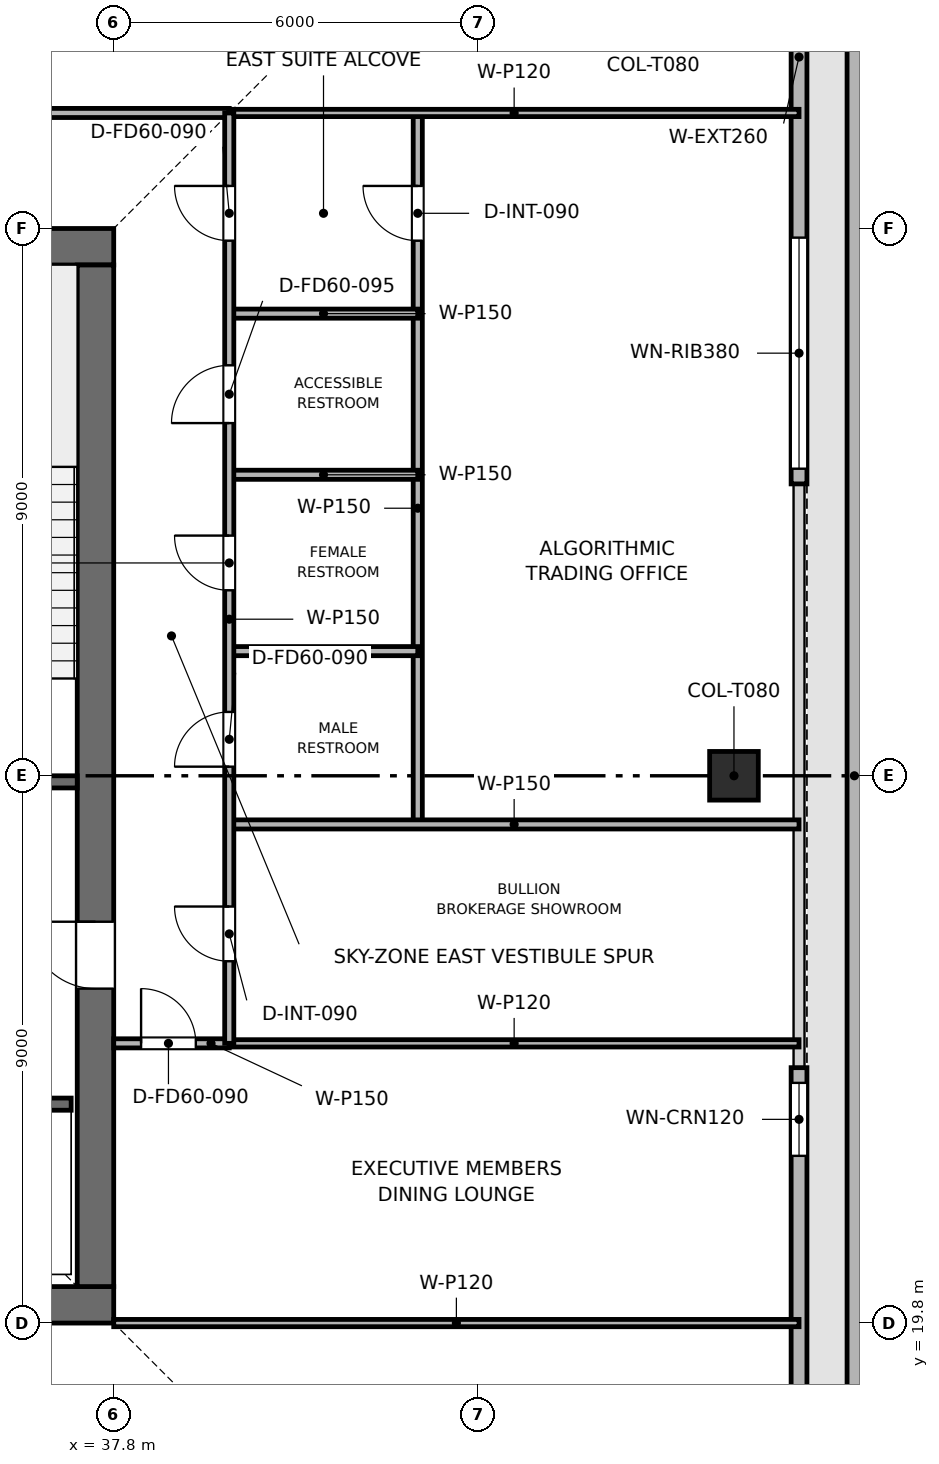
"""IFC4 building model, lengths in metres.
Left out: names, types, materials, properties, quantities, classifications, styles, units other than length and angle.
Written with IfcOpenShell. Run it as: python <this file> out.ifc"""

import sys

from ifc_helpers import new_model, si_unit, direction, frame, frame_2d, origin, origin_2d, place, context, subcontext, project, spatial, rectangle, extrude, element, fill, save


model = new_model("IFC4")
c1 = context("Model", 3, precision=1e-05, world=origin(), true_north=direction((0.0, 1.0)))
c2 = subcontext(c1, "Body", "Model", "MODEL_VIEW")
j1 = project(units=[si_unit("LENGTHUNIT", "METRE"), si_unit("PLANEANGLEUNIT", "RADIAN")], contexts=[c1])
p1 = place(None, origin())
s1 = spatial("IfcSite", under=j1, at=p1, CompositionType="ELEMENT")
p2 = place(p1, origin())
s2 = spatial("IfcBuilding", under=s1, at=p2, CompositionType="ELEMENT")
p3 = place(p2, frame((0.0, 0.0, 355.5)))
s3 = spatial("IfcBuildingStorey", under=s2, at=p3, CompositionType="ELEMENT", Elevation=355.5)
p4 = place(p3, frame((19.8, 20.1, 0.0), z_axis=(0.0, 0.0, 1.0), x_axis=(1.0, 0.0, 0.0)))
e1 = element("IfcWall", 1, at=p4, inside=s3, PredefinedType="SHEAR", context=c2, shape_type="SweptSolid", body=[
    extrude(rectangle(XDim=18.0, YDim=0.6, at=frame_2d((9.0, 0.0))), origin(), (0.0, 0.0, 1.0), 4.5),
])
p5 = place(p3, frame((19.8, 37.5, 0.0), z_axis=(0.0, 0.0, 1.0), x_axis=(1.0, 0.0, 0.0)))
e2 = element("IfcWall", 2, at=p5, inside=s3, PredefinedType="SHEAR", context=c2, shape_type="SweptSolid", body=[
    extrude(rectangle(XDim=18.0, YDim=0.6, at=frame_2d((9.0, 0.0))), origin(), (0.0, 0.0, 1.0), 4.5),
])
p6 = place(p5, frame((7.05, 0.0, 0.0)))
e3 = element("IfcOpeningElement", 3, at=p6, cuts=e2, PredefinedType="OPENING", context=c2, shape_type="SweptSolid", body=[
    extrude(rectangle(XDim=1.1, YDim=2.15, at=frame_2d((0.55, 1.075))), frame((0.0, 0.31, 0.0), z_axis=(0.0, -1.0, 0.0), x_axis=(1.0, 0.0, 0.0)), (0.0, 0.0, 1.0), 0.62),
])
p7 = place(p3, frame((37.5, 20.4, 0.0), z_axis=(0.0, 0.0, 1.0), x_axis=(0.0, 1.0, 0.0)))
e4 = element("IfcWall", 4, at=p7, inside=s3, PredefinedType="SHEAR", context=c2, shape_type="SweptSolid", body=[
    extrude(rectangle(XDim=16.8, YDim=0.6, at=frame_2d((8.4, 0.0))), origin(), (0.0, 0.0, 1.0), 4.5),
])
p8 = place(p7, frame((4.9, 0.0, 0.0)))
e5 = element("IfcOpeningElement", 5, at=p8, cuts=e4, PredefinedType="OPENING", context=c2, shape_type="SweptSolid", body=[
    extrude(rectangle(XDim=1.1, YDim=2.15, at=frame_2d((0.55, 1.075))), frame((0.0, 0.31, 0.0), z_axis=(0.0, -1.0, 0.0), x_axis=(1.0, 0.0, 0.0)), (0.0, 0.0, 1.0), 0.62),
])
p9 = place(p3, frame((48.0, 28.8, 0.003), z_axis=(0.0, 0.0, 1.0), x_axis=(1.0, 0.0, 0.0)))
e6 = element("IfcColumn", 6, at=p9, inside=s3, PredefinedType="COLUMN", context=c2, shape_type="SweptSolid", body=[
    extrude(rectangle(XDim=0.8, YDim=0.8, at=origin_2d()), origin(), (0.0, 0.0, 1.0), 4.234),
])
p10 = place(p3, frame((49.98, 13.555, 0.0), z_axis=(0.0, 0.0, 1.0), x_axis=(0.0, 1.0, 0.0)))
e7 = element("IfcWall", 7, at=p10, inside=s3, PredefinedType="PARAPET", context=c2, shape_type="SweptSolid", body=[
    extrude(rectangle(XDim=30.49, YDim=0.24, at=frame_2d((15.245, 0.0))), origin(), (0.0, 0.0, 1.0), 1.2),
])
p11 = place(p3, frame((49.07, 43.6, 0.0), z_axis=(0.0, 0.0, 1.0), x_axis=(0.0, -1.0, 0.0)))
e8 = element("IfcWall", 8, at=p11, inside=s3, PredefinedType="SOLIDWALL", context=c2, shape_type="SweptSolid", body=[
    extrude(rectangle(XDim=10.0, YDim=0.26, at=frame_2d((5.0, 0.0))), origin(), (0.0, 0.0, 1.0), 4.24),
])
p12 = place(p11, frame((5.95, 0.0, 0.9)))
e9 = element("IfcOpeningElement", 9, at=p12, cuts=e8, PredefinedType="OPENING", context=c2, shape_type="SweptSolid", body=[
    extrude(rectangle(XDim=3.8, YDim=1.9, at=frame_2d((1.9, 0.95))), frame((0.0, 0.14, 0.0), z_axis=(0.0, -1.0, 0.0), x_axis=(1.0, 0.0, 0.0)), (0.0, 0.0, 1.0), 0.28),
])
p13 = place(p3, frame((49.07, 24.0, 0.0), z_axis=(0.0, 0.0, 1.0), x_axis=(0.0, -1.0, 0.0)))
e10 = element("IfcWall", 10, at=p13, inside=s3, PredefinedType="SOLIDWALL", context=c2, shape_type="SweptSolid", body=[
    extrude(rectangle(XDim=10.0, YDim=0.26, at=frame_2d((5.0, 0.0))), origin(), (0.0, 0.0, 1.0), 4.24),
])
p14 = place(p13, frame((0.25, 0.0, 0.9)))
e11 = element("IfcOpeningElement", 11, at=p14, cuts=e10, PredefinedType="OPENING", context=c2, shape_type="SweptSolid", body=[
    extrude(rectangle(XDim=1.2, YDim=2.1, at=frame_2d((0.6, 1.05))), frame((0.0, 0.14, 0.0), z_axis=(0.0, -1.0, 0.0), x_axis=(1.0, 0.0, 0.0)), (0.0, 0.0, 1.0), 0.28),
])
p15 = place(p3, frame((34.05, 28.7, 0.0), z_axis=(0.0, 0.0, 1.0), x_axis=(1.0, 0.0, 0.0)))
e12 = element("IfcWall", 12, at=p15, inside=s3, PredefinedType="SHEAR", context=c2, shape_type="SweptSolid", body=[
    extrude(rectangle(XDim=3.15, YDim=0.2, at=frame_2d((1.575, 0.0))), origin(), (0.0, 0.0, 1.0), 4.24),
])
p16 = place(p15, frame((0.8, 0.0, 0.0)))
e13 = element("IfcOpeningElement", 13, at=p16, cuts=e12, PredefinedType="OPENING", context=c2, shape_type="SweptSolid", body=[
    extrude(rectangle(XDim=1.0, YDim=2.1, at=frame_2d((0.5, 1.05))), frame((0.0, 0.11, 0.0), z_axis=(0.0, -1.0, 0.0), x_axis=(1.0, 0.0, 0.0)), (0.0, 0.0, 1.0), 0.22),
])
p17 = place(p3, frame((34.05, 23.4, 0.0), z_axis=(0.0, 0.0, 1.0), x_axis=(1.0, 0.0, 0.0)))
e14 = element("IfcWall", 14, at=p17, inside=s3, PredefinedType="SHEAR", context=c2, shape_type="SweptSolid", body=[
    extrude(rectangle(XDim=3.05, YDim=0.2, at=frame_2d((1.525, 0.0))), origin(), (0.0, 0.0, 1.0), 4.24),
])
p18 = place(p17, frame((1.2, 0.0, 0.0)))
e15 = element("IfcOpeningElement", 15, at=p18, cuts=e14, PredefinedType="OPENING", context=c2, shape_type="SweptSolid", body=[
    extrude(rectangle(XDim=1.1, YDim=2.15, at=frame_2d((0.55, 1.075))), frame((0.0, 0.11, 0.0), z_axis=(0.0, -1.0, 0.0), x_axis=(1.0, 0.0, 0.0)), (0.0, 0.0, 1.0), 0.22),
])
p19 = place(p3, frame((37.8, 19.8, 0.0), z_axis=(0.0, 0.0, 1.0), x_axis=(1.0, 0.0, 0.0)))
e16 = element("IfcWall", 16, at=p19, inside=s3, PredefinedType="PARTITIONING", context=c2, shape_type="SweptSolid", body=[
    extrude(rectangle(XDim=11.27, YDim=0.12, at=frame_2d((5.635, 0.0))), origin(), (0.0, 0.0, 1.0), 3.825),
])
p20 = place(p3, frame((37.8, 24.4, 0.0), z_axis=(0.0, 0.0, 1.0), x_axis=(1.0, 0.0, 0.0)))
e17 = element("IfcWall", 17, at=p20, inside=s3, PredefinedType="PARTITIONING", context=c2, shape_type="SweptSolid", body=[
    extrude(rectangle(XDim=1.9, YDim=0.15, at=frame_2d((0.95, 0.0))), origin(), (0.0, 0.0, 1.0), 4.24),
])
p21 = place(p20, frame((0.45, 0.0, 0.0)))
e18 = element("IfcOpeningElement", 18, at=p21, cuts=e17, PredefinedType="OPENING", context=c2, shape_type="SweptSolid", body=[
    extrude(rectangle(XDim=0.9, YDim=2.1, at=frame_2d((0.45, 1.05))), frame((0.0, 0.085, 0.0), z_axis=(0.0, -1.0, 0.0), x_axis=(1.0, 0.0, 0.0)), (0.0, 0.0, 1.0), 0.17),
])
p22 = place(p3, frame((39.7, 24.4, 0.0), z_axis=(0.0, 0.0, 1.0), x_axis=(1.0, 0.0, 0.0)))
e19 = element("IfcWall", 19, at=p22, inside=s3, PredefinedType="PARTITIONING", context=c2, shape_type="SweptSolid", body=[
    extrude(rectangle(XDim=9.37, YDim=0.12, at=frame_2d((4.685, 0.0))), origin(), (0.0, 0.0, 1.0), 3.865),
])
p23 = place(p3, frame((42.8, 28.0, 0.0), z_axis=(0.0, 0.0, 1.0), x_axis=(0.0, 1.0, 0.0)))
e20 = element("IfcWall", 20, at=p23, inside=s3, PredefinedType="PARTITIONING", context=c2, shape_type="SweptSolid", body=[
    extrude(rectangle(XDim=11.7, YDim=0.15, at=frame_2d((5.85, 0.0))), origin(), (0.0, 0.0, 1.0), 3.825),
])
p24 = place(p23, frame((9.6, 0.0, 0.0)))
e21 = element("IfcOpeningElement", 21, at=p24, cuts=e20, PredefinedType="OPENING", context=c2, shape_type="SweptSolid", body=[
    extrude(rectangle(XDim=0.9, YDim=2.1, at=frame_2d((0.45, 1.05))), frame((0.0, 0.085, 0.0), z_axis=(0.0, -1.0, 0.0), x_axis=(1.0, 0.0, 0.0)), (0.0, 0.0, 1.0), 0.17),
])
p25 = place(p3, frame((39.7, 28.0, 0.0), z_axis=(0.0, 0.0, 1.0), x_axis=(1.0, 0.0, 0.0)))
e22 = element("IfcWall", 22, at=p25, inside=s3, PredefinedType="PARTITIONING", context=c2, shape_type="SweptSolid", body=[
    extrude(rectangle(XDim=9.37, YDim=0.15, at=frame_2d((4.685, 0.0))), origin(), (0.0, 0.0, 1.0), 3.865),
])
for number, where, z_axis, x_axis in (
    (23, (39.7, 36.4, 0.0), (0.0, 0.0, 1.0), (1.0, 0.0, 0.0)),
    (24, (39.7, 30.85, 0.0), (0.0, 0.0, 1.0), (1.0, 0.0, 0.0)),
    (25, (39.7, 33.75, 0.0), (0.0, 0.0, 1.0), (1.0, 0.0, 0.0)),
):
    element("IfcWall", number, at=place(p3, frame(where, z_axis=z_axis, x_axis=x_axis)), inside=s3, PredefinedType="PARTITIONING", context=c2, shape_type="SweptSolid", body=[
        extrude(rectangle(XDim=3.1, YDim=0.15, at=frame_2d((1.55, 0.0))), origin(), (0.0, 0.0, 1.0), 3.865),
    ])
p26 = place(p3, frame((39.7, 39.7, 0.0), z_axis=(0.0, 0.0, 1.0), x_axis=(1.0, 0.0, 0.0)))
e26 = element("IfcWall", 26, at=p26, inside=s3, PredefinedType="PARTITIONING", context=c2, shape_type="SweptSolid", body=[
    extrude(rectangle(XDim=9.37, YDim=0.12, at=frame_2d((4.685, 0.0))), origin(), (0.0, 0.0, 1.0), 3.825),
])
p27 = place(p3, frame((17.9, 39.7, 0.0), z_axis=(0.0, 0.0, 1.0), x_axis=(1.0, 0.0, 0.0)))
e27 = element("IfcWall", 27, at=p27, inside=s3, PredefinedType="PARTITIONING", context=c2, shape_type="SweptSolid", body=[
    extrude(rectangle(XDim=21.8, YDim=0.15, at=frame_2d((10.9, 0.0))), origin(), (0.0, 0.0, 1.0), 3.825),
])
p28 = place(p27, frame((0.765, 0.0, 0.0)))
e28 = element("IfcOpeningElement", 28, at=p28, cuts=e27, PredefinedType="OPENING", context=c2, shape_type="SweptSolid", body=[
    extrude(rectangle(XDim=0.9, YDim=2.1, at=frame_2d((0.45, 1.05))), frame((0.0, 0.085, 0.0), z_axis=(0.0, -1.0, 0.0), x_axis=(1.0, 0.0, 0.0)), (0.0, 0.0, 1.0), 0.17),
])
p29 = place(p27, frame((6.195, 0.0, 0.0)))
e29 = element("IfcOpeningElement", 29, at=p29, cuts=e27, PredefinedType="OPENING", context=c2, shape_type="SweptSolid", body=[
    extrude(rectangle(XDim=0.9, YDim=2.1, at=frame_2d((0.45, 1.05))), frame((0.0, 0.085, 0.0), z_axis=(0.0, -1.0, 0.0), x_axis=(1.0, 0.0, 0.0)), (0.0, 0.0, 1.0), 0.17),
])
p30 = place(p27, frame((15.88, 0.0, 0.0)))
e30 = element("IfcOpeningElement", 30, at=p30, cuts=e27, PredefinedType="OPENING", context=c2, shape_type="SweptSolid", body=[
    extrude(rectangle(XDim=0.9, YDim=2.1, at=frame_2d((0.45, 1.05))), frame((0.0, 0.085, 0.0), z_axis=(0.0, -1.0, 0.0), x_axis=(1.0, 0.0, 0.0)), (0.0, 0.0, 1.0), 0.17),
])
p31 = place(p3, frame((39.7, 24.4, 0.0), z_axis=(0.0, 0.0, 1.0), x_axis=(0.0, 1.0, 0.0)))
e31 = element("IfcWall", 31, at=p31, inside=s3, PredefinedType="PARTITIONING", context=c2, shape_type="SweptSolid", body=[
    extrude(rectangle(XDim=15.3, YDim=0.15, at=frame_2d((7.65, 0.0))), origin(), (0.0, 0.0, 1.0), 3.825),
])
p32 = place(p31, frame((1.35, 0.0, 0.0)))
e32 = element("IfcOpeningElement", 32, at=p32, cuts=e31, PredefinedType="OPENING", context=c2, shape_type="SweptSolid", body=[
    extrude(rectangle(XDim=0.9, YDim=2.1, at=frame_2d((0.45, 1.05))), frame((0.0, 0.085, 0.0), z_axis=(0.0, -1.0, 0.0), x_axis=(1.0, 0.0, 0.0)), (0.0, 0.0, 1.0), 0.17),
])
p33 = place(p31, frame((4.55, 0.0, 0.0)))
e33 = element("IfcOpeningElement", 33, at=p33, cuts=e31, PredefinedType="OPENING", context=c2, shape_type="SweptSolid", body=[
    extrude(rectangle(XDim=0.9, YDim=2.1, at=frame_2d((0.45, 1.05))), frame((0.0, 0.085, 0.0), z_axis=(0.0, -1.0, 0.0), x_axis=(1.0, 0.0, 0.0)), (0.0, 0.0, 1.0), 0.17),
])
p34 = place(p31, frame((7.45, 0.0, 0.0)))
e34 = element("IfcOpeningElement", 34, at=p34, cuts=e31, PredefinedType="OPENING", context=c2, shape_type="SweptSolid", body=[
    extrude(rectangle(XDim=0.9, YDim=2.1, at=frame_2d((0.45, 1.05))), frame((0.0, 0.085, 0.0), z_axis=(0.0, -1.0, 0.0), x_axis=(1.0, 0.0, 0.0)), (0.0, 0.0, 1.0), 0.17),
])
p35 = place(p31, frame((10.2, 0.0, 0.0)))
e35 = element("IfcOpeningElement", 35, at=p35, cuts=e31, PredefinedType="OPENING", context=c2, shape_type="SweptSolid", body=[
    extrude(rectangle(XDim=0.95, YDim=2.1, at=frame_2d((0.475, 1.05))), frame((0.0, 0.085, 0.0), z_axis=(0.0, -1.0, 0.0), x_axis=(1.0, 0.0, 0.0)), (0.0, 0.0, 1.0), 0.17),
])
p36 = place(p31, frame((13.2, 0.0, 0.0)))
e36 = element("IfcOpeningElement", 36, at=p36, cuts=e31, PredefinedType="OPENING", context=c2, shape_type="SweptSolid", body=[
    extrude(rectangle(XDim=0.9, YDim=2.1, at=frame_2d((0.45, 1.05))), frame((0.0, 0.085, 0.0), z_axis=(0.0, -1.0, 0.0), x_axis=(1.0, 0.0, 0.0)), (0.0, 0.0, 1.0), 0.17),
])
p37 = place(p12, origin())
e37 = element("IfcWindow", 37, at=p37, inside=s3, PartitioningType="SINGLE_PANEL", PredefinedType="WINDOW", context=c2, shape_type="SweptSolid", body=[
    extrude(rectangle(XDim=3.8, YDim=1.9, at=frame_2d((1.9, 0.95))), frame((0.0, 0.03, 0.0), z_axis=(0.0, -1.0, 0.0), x_axis=(1.0, 0.0, 0.0)), (0.0, 0.0, 1.0), 0.06),
])
fill(e9, e37)
p38 = place(p14, origin())
e38 = element("IfcWindow", 38, at=p38, inside=s3, PartitioningType="SINGLE_PANEL", PredefinedType="WINDOW", context=c2, shape_type="SweptSolid", body=[
    extrude(rectangle(XDim=1.2, YDim=2.1, at=frame_2d((0.6, 1.05))), frame((0.0, 0.03, 0.0), z_axis=(0.0, -1.0, 0.0), x_axis=(1.0, 0.0, 0.0)), (0.0, 0.0, 1.0), 0.06),
])
fill(e11, e38)
p39 = place(p21, origin())
e39 = element("IfcDoor", 39, at=p39, inside=s3, OperationType="SINGLE_SWING_LEFT", PredefinedType="DOOR", context=c2, shape_type="SweptSolid", body=[
    extrude(rectangle(XDim=0.9, YDim=2.1, at=frame_2d((0.45, 1.05))), frame((0.0, 0.025, 0.0), z_axis=(0.0, -1.0, 0.0), x_axis=(1.0, 0.0, 0.0)), (0.0, 0.0, 1.0), 0.05),
])
fill(e18, e39)
p40 = place(p24, origin())
e40 = element("IfcDoor", 40, at=p40, inside=s3, OperationType="SINGLE_SWING_RIGHT", PredefinedType="DOOR", context=c2, shape_type="SweptSolid", body=[
    extrude(rectangle(XDim=0.9, YDim=2.1, at=frame_2d((0.45, 1.05))), frame((0.0, 0.025, 0.0), z_axis=(0.0, -1.0, 0.0), x_axis=(1.0, 0.0, 0.0)), (0.0, 0.0, 1.0), 0.05),
])
fill(e21, e40)
p41 = place(p32, origin())
e41 = element("IfcDoor", 41, at=p41, inside=s3, OperationType="SINGLE_SWING_RIGHT", PredefinedType="DOOR", context=c2, shape_type="SweptSolid", body=[
    extrude(rectangle(XDim=0.9, YDim=2.1, at=frame_2d((0.45, 1.05))), frame((0.0, 0.025, 0.0), z_axis=(0.0, -1.0, 0.0), x_axis=(1.0, 0.0, 0.0)), (0.0, 0.0, 1.0), 0.05),
])
fill(e32, e41)
p42 = place(p33, origin())
e42 = element("IfcDoor", 42, at=p42, inside=s3, OperationType="SINGLE_SWING_LEFT", PredefinedType="DOOR", context=c2, shape_type="SweptSolid", body=[
    extrude(rectangle(XDim=0.9, YDim=2.1, at=frame_2d((0.45, 1.05))), frame((0.0, 0.025, 0.0), z_axis=(0.0, -1.0, 0.0), x_axis=(1.0, 0.0, 0.0)), (0.0, 0.0, 1.0), 0.05),
])
fill(e33, e42)
p43 = place(p34, origin())
e43 = element("IfcDoor", 43, at=p43, inside=s3, OperationType="SINGLE_SWING_RIGHT", PredefinedType="DOOR", context=c2, shape_type="SweptSolid", body=[
    extrude(rectangle(XDim=0.9, YDim=2.1, at=frame_2d((0.45, 1.05))), frame((0.0, 0.025, 0.0), z_axis=(0.0, -1.0, 0.0), x_axis=(1.0, 0.0, 0.0)), (0.0, 0.0, 1.0), 0.05),
])
fill(e34, e43)
p44 = place(p35, origin())
e44 = element("IfcDoor", 44, at=p44, inside=s3, OperationType="SINGLE_SWING_LEFT", PredefinedType="DOOR", context=c2, shape_type="SweptSolid", body=[
    extrude(rectangle(XDim=0.95, YDim=2.1, at=frame_2d((0.475, 1.05))), frame((0.0, 0.025, 0.0), z_axis=(0.0, -1.0, 0.0), x_axis=(1.0, 0.0, 0.0)), (0.0, 0.0, 1.0), 0.05),
])
fill(e35, e44)
p45 = place(p36, origin())
e45 = element("IfcDoor", 45, at=p45, inside=s3, OperationType="SINGLE_SWING_RIGHT", PredefinedType="DOOR", context=c2, shape_type="SweptSolid", body=[
    extrude(rectangle(XDim=0.9, YDim=2.1, at=frame_2d((0.45, 1.05))), frame((0.0, 0.025, 0.0), z_axis=(0.0, -1.0, 0.0), x_axis=(1.0, 0.0, 0.0)), (0.0, 0.0, 1.0), 0.05),
])
fill(e36, e45)
p46 = place(p8, origin())
e46 = element("IfcDoor", 46, at=p46, inside=s3, OperationType="SINGLE_SWING_RIGHT", PredefinedType="DOOR", context=c2, shape_type="SweptSolid", body=[
    extrude(rectangle(XDim=1.1, YDim=2.15, at=frame_2d((0.55, 1.075))), frame((0.0, 0.025, 0.0), z_axis=(0.0, -1.0, 0.0), x_axis=(1.0, 0.0, 0.0)), (0.0, 0.0, 1.0), 0.05),
])
fill(e5, e46)
save(model, sys.argv[1])
